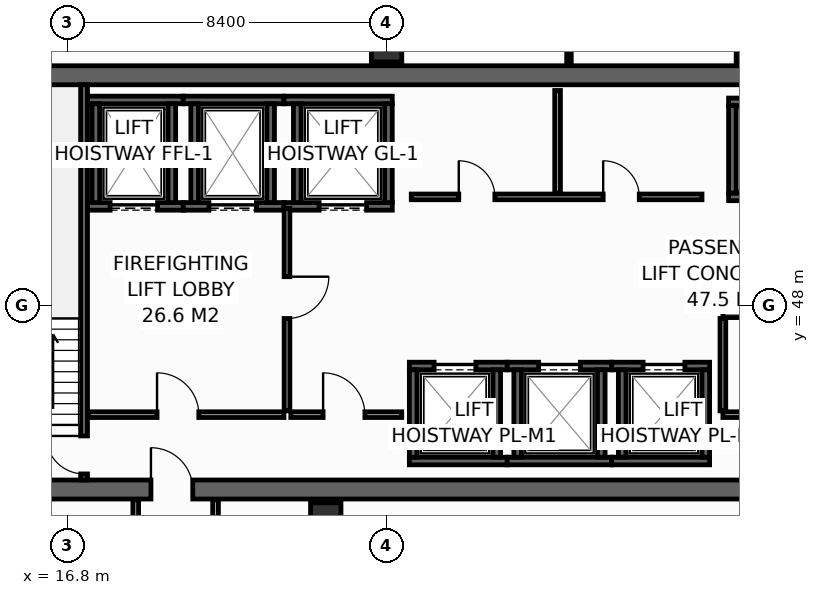
"""IFC4 building model, lengths in metres.
Left out: names, types, materials, properties, quantities, classifications, styles, units other than length and angle.
Written with IfcOpenShell. Run it as: python <this file> out.ifc"""

import sys

from ifc_helpers import new_model, si_unit, direction, frame, frame_2d, origin, origin_2d, place, context, subcontext, project, spatial, rectangle, hollow_rectangle, extrude, element, fill, save


model = new_model("IFC4")
c1 = context("Model", 3, precision=1e-05, world=origin(), true_north=direction((0.0, 1.0)))
c2 = subcontext(c1, "Body", "Model", "MODEL_VIEW")
j1 = project(units=[si_unit("LENGTHUNIT", "METRE"), si_unit("PLANEANGLEUNIT", "RADIAN")], contexts=[c1])
p1 = place(None, origin())
s1 = spatial("IfcSite", under=j1, at=p1, CompositionType="ELEMENT")
p2 = place(p1, origin())
s2 = spatial("IfcBuilding", under=s1, at=p2, CompositionType="ELEMENT")
p3 = place(p2, frame((0.0, 0.0, 213.2)))
s3 = spatial("IfcBuildingStorey", under=s2, at=p3, CompositionType="ELEMENT", Elevation=213.2)
p4 = place(p3, frame((13.6, 43.15, 0.0), z_axis=(0.0, 0.0, 1.0), x_axis=(1.0, 0.0, 0.0)))
e1 = element("IfcWall", 1, at=p4, inside=s3, PredefinedType="SHEAR", context=c2, shape_type="SweptSolid", body=[
    extrude(rectangle(XDim=32.7, YDim=0.5, at=frame_2d((16.35, 0.0))), origin(), (0.0, 0.0, 1.0), 3.55),
])
p5 = place(p4, frame((5.4, 0.0, 0.0)))
e2 = element("IfcOpeningElement", 2, at=p5, cuts=e1, PredefinedType="OPENING", context=c2, shape_type="SweptSolid", body=[
    extrude(rectangle(XDim=1.1, YDim=2.15, at=frame_2d((0.55, 1.075))), frame((0.0, 0.26, 0.0), z_axis=(0.0, -1.0, 0.0), x_axis=(1.0, 0.0, 0.0)), (0.0, 0.0, 1.0), 0.52),
])
p6 = place(p4, frame((25.6, 0.0, 0.0)))
e3 = element("IfcOpeningElement", 3, at=p6, cuts=e1, PredefinedType="OPENING", context=c2, shape_type="SweptSolid", body=[
    extrude(rectangle(XDim=1.1, YDim=2.15, at=frame_2d((0.55, 1.075))), frame((0.0, 0.26, 0.0), z_axis=(0.0, -1.0, 0.0), x_axis=(1.0, 0.0, 0.0)), (0.0, 0.0, 1.0), 0.52),
])
p7 = place(p3, frame((13.6, 54.05, 0.0), z_axis=(0.0, 0.0, 1.0), x_axis=(1.0, 0.0, 0.0)))
e4 = element("IfcWall", 4, at=p7, inside=s3, PredefinedType="SHEAR", context=c2, shape_type="SweptSolid", body=[
    extrude(rectangle(XDim=32.7, YDim=0.5, at=frame_2d((16.35, 0.0))), origin(), (0.0, 0.0, 1.0), 3.55),
])
for number, where, z_axis, x_axis in (
    (5, (25.2, 54.8, 0.0), (0.0, 0.0, 1.0), (1.0, 0.0, 0.0)),
    (6, (34.8, 54.8, 0.0), (0.0, 0.0, 1.0), (1.0, 0.0, 0.0)),
    (7, (23.6, 42.4, 0.0), (0.0, 0.0, 1.0), (1.0, 0.0, 0.0)),
):
    element("IfcColumn", number, at=place(p3, frame(where, z_axis=z_axis, x_axis=x_axis)), inside=s3, PredefinedType="COLUMN", context=c2, shape_type="SweptSolid", body=[
        extrude(hollow_rectangle(XDim=0.8, YDim=0.8, WallThickness=0.036, at=origin_2d()), origin(), (0.0, 0.0, 1.0), 3.8),
    ])
p8 = place(p3, frame((17.33, 50.6, 0.0), z_axis=(0.0, 0.0, 1.0), x_axis=(1.0, 0.0, 0.0)))
e8 = element("IfcWall", 8, at=p8, inside=s3, PredefinedType="SHEAR", context=c2, shape_type="SweptSolid", body=[
    extrude(rectangle(XDim=2.52, YDim=0.2, at=frame_2d((1.26, 0.0))), origin(), (0.0, 0.0, 1.0), 3.55),
])
p9 = place(p8, frame((0.595, 0.0, 0.0)))
e9 = element("IfcOpeningElement", 9, at=p9, cuts=e8, PredefinedType="OPENING", context=c2, shape_type="SweptSolid", body=[
    extrude(rectangle(XDim=1.25, YDim=2.3, at=frame_2d((0.625, 1.15))), frame((0.0, 0.11, 0.0), z_axis=(0.0, -1.0, 0.0), x_axis=(1.0, 0.0, 0.0)), (0.0, 0.0, 1.0), 0.22),
])
p10 = place(p3, frame((17.33, 53.4, 0.0), z_axis=(0.0, 0.0, 1.0), x_axis=(1.0, 0.0, 0.0)))
e10 = element("IfcWall", 10, at=p10, inside=s3, PredefinedType="SHEAR", context=c2, shape_type="SweptSolid", body=[
    extrude(rectangle(XDim=2.52, YDim=0.2, at=frame_2d((1.26, 0.0))), origin(), (0.0, 0.0, 1.0), 3.55),
])
for number, where, z_axis, x_axis in (
    (11, (17.55, 50.7, 0.0), (0.0, 0.0, 1.0), (0.0, 1.0, 0.0)),
    (12, (19.55, 50.7, 0.0), (0.0, 0.0, 1.0), (0.0, 1.0, 0.0)),
):
    element("IfcWall", number, at=place(p3, frame(where, z_axis=z_axis, x_axis=x_axis)), inside=s3, PredefinedType="SHEAR", context=c2, shape_type="SweptSolid", body=[
        extrude(rectangle(XDim=2.6, YDim=0.2, at=frame_2d((1.3, 0.0))), origin(), (0.0, 0.0, 1.0), 3.55),
    ])
p11 = place(p3, frame((19.85, 50.6, 0.0), z_axis=(0.0, 0.0, 1.0), x_axis=(1.0, 0.0, 0.0)))
e13 = element("IfcWall", 13, at=p11, inside=s3, PredefinedType="SHEAR", context=c2, shape_type="SweptSolid", body=[
    extrude(rectangle(XDim=2.65, YDim=0.2, at=frame_2d((1.325, 0.0))), origin(), (0.0, 0.0, 1.0), 3.55),
])
p12 = place(p11, frame((0.675, 0.0, 0.0)))
e14 = element("IfcOpeningElement", 14, at=p12, cuts=e13, PredefinedType="OPENING", context=c2, shape_type="SweptSolid", body=[
    extrude(rectangle(XDim=1.25, YDim=2.3, at=frame_2d((0.625, 1.15))), frame((0.0, 0.11, 0.0), z_axis=(0.0, -1.0, 0.0), x_axis=(1.0, 0.0, 0.0)), (0.0, 0.0, 1.0), 0.22),
])
p13 = place(p3, frame((19.85, 53.4, 0.0), z_axis=(0.0, 0.0, 1.0), x_axis=(1.0, 0.0, 0.0)))
e15 = element("IfcWall", 15, at=p13, inside=s3, PredefinedType="SHEAR", context=c2, shape_type="SweptSolid", body=[
    extrude(rectangle(XDim=2.65, YDim=0.2, at=frame_2d((1.325, 0.0))), origin(), (0.0, 0.0, 1.0), 3.55),
])
for number, where, z_axis, x_axis in (
    (16, (20.15, 50.7, 0.0), (0.0, 0.0, 1.0), (0.0, 1.0, 0.0)),
    (17, (22.15, 50.7, 0.0), (0.0, 0.0, 1.0), (0.0, 1.0, 0.0)),
):
    element("IfcWall", number, at=place(p3, frame(where, z_axis=z_axis, x_axis=x_axis)), inside=s3, PredefinedType="SHEAR", context=c2, shape_type="SweptSolid", body=[
        extrude(rectangle(XDim=2.6, YDim=0.2, at=frame_2d((1.3, 0.0))), origin(), (0.0, 0.0, 1.0), 3.55),
    ])
p14 = place(p3, frame((22.5, 50.6, 0.0), z_axis=(0.0, 0.0, 1.0), x_axis=(1.0, 0.0, 0.0)))
e18 = element("IfcWall", 18, at=p14, inside=s3, PredefinedType="SHEAR", context=c2, shape_type="SweptSolid", body=[
    extrude(rectangle(XDim=2.85, YDim=0.2, at=frame_2d((1.425, 0.0))), origin(), (0.0, 0.0, 1.0), 3.55),
])
p15 = place(p14, frame((0.925, 0.0, 0.0)))
e19 = element("IfcOpeningElement", 19, at=p15, cuts=e18, PredefinedType="OPENING", context=c2, shape_type="SweptSolid", body=[
    extrude(rectangle(XDim=1.25, YDim=2.3, at=frame_2d((0.625, 1.15))), frame((0.0, 0.11, 0.0), z_axis=(0.0, -1.0, 0.0), x_axis=(1.0, 0.0, 0.0)), (0.0, 0.0, 1.0), 0.22),
])
p16 = place(p3, frame((22.5, 53.4, 0.0), z_axis=(0.0, 0.0, 1.0), x_axis=(1.0, 0.0, 0.0)))
e20 = element("IfcWall", 20, at=p16, inside=s3, PredefinedType="SHEAR", context=c2, shape_type="SweptSolid", body=[
    extrude(rectangle(XDim=2.85, YDim=0.2, at=frame_2d((1.425, 0.0))), origin(), (0.0, 0.0, 1.0), 3.55),
])
for number, where, z_axis, x_axis in (
    (21, (22.85, 50.7, 0.0), (0.0, 0.0, 1.0), (0.0, 1.0, 0.0)),
    (22, (25.25, 50.7, 0.0), (0.0, 0.0, 1.0), (0.0, 1.0, 0.0)),
):
    element("IfcWall", number, at=place(p3, frame(where, z_axis=z_axis, x_axis=x_axis)), inside=s3, PredefinedType="SHEAR", context=c2, shape_type="SweptSolid", body=[
        extrude(rectangle(XDim=2.6, YDim=0.2, at=frame_2d((1.3, 0.0))), origin(), (0.0, 0.0, 1.0), 3.55),
    ])
p17 = place(p3, frame((25.8, 43.9, 0.0), z_axis=(0.0, 0.0, 1.0), x_axis=(1.0, 0.0, 0.0)))
e23 = element("IfcWall", 23, at=p17, inside=s3, PredefinedType="SHEAR", context=c2, shape_type="SweptSolid", body=[
    extrude(rectangle(XDim=2.575, YDim=0.2, at=frame_2d((1.288, 0.0))), origin(), (0.0, 0.0, 1.0), 3.55),
])
p18 = place(p3, frame((25.8, 46.4, 0.0), z_axis=(0.0, 0.0, 1.0), x_axis=(1.0, 0.0, 0.0)))
e24 = element("IfcWall", 24, at=p18, inside=s3, PredefinedType="SHEAR", context=c2, shape_type="SweptSolid", body=[
    extrude(rectangle(XDim=2.575, YDim=0.2, at=frame_2d((1.288, 0.0))), origin(), (0.0, 0.0, 1.0), 3.55),
])
p19 = place(p18, frame((0.65, 0.0, 0.0)))
e25 = element("IfcOpeningElement", 25, at=p19, cuts=e24, PredefinedType="OPENING", context=c2, shape_type="SweptSolid", body=[
    extrude(rectangle(XDim=1.1, YDim=2.2, at=frame_2d((0.55, 1.1))), frame((0.0, 0.11, 0.0), z_axis=(0.0, -1.0, 0.0), x_axis=(1.0, 0.0, 0.0)), (0.0, 0.0, 1.0), 0.22),
])
for number, where, z_axis, x_axis in (
    (26, (25.9, 44.0, 0.0), (0.0, 0.0, 1.0), (0.0, 1.0, 0.0)),
    (27, (28.1, 44.0, 0.0), (0.0, 0.0, 1.0), (0.0, 1.0, 0.0)),
):
    element("IfcWall", number, at=place(p3, frame(where, z_axis=z_axis, x_axis=x_axis)), inside=s3, PredefinedType="SHEAR", context=c2, shape_type="SweptSolid", body=[
        extrude(rectangle(XDim=2.3, YDim=0.2, at=frame_2d((1.15, 0.0))), origin(), (0.0, 0.0, 1.0), 3.55),
    ])
p20 = place(p3, frame((28.375, 43.9, 0.0), z_axis=(0.0, 0.0, 1.0), x_axis=(1.0, 0.0, 0.0)))
e28 = element("IfcWall", 28, at=p20, inside=s3, PredefinedType="SHEAR", context=c2, shape_type="SweptSolid", body=[
    extrude(rectangle(XDim=2.75, YDim=0.2, at=frame_2d((1.375, 0.0))), origin(), (0.0, 0.0, 1.0), 3.55),
])
p21 = place(p3, frame((28.375, 46.4, 0.0), z_axis=(0.0, 0.0, 1.0), x_axis=(1.0, 0.0, 0.0)))
e29 = element("IfcWall", 29, at=p21, inside=s3, PredefinedType="SHEAR", context=c2, shape_type="SweptSolid", body=[
    extrude(rectangle(XDim=2.75, YDim=0.2, at=frame_2d((1.375, 0.0))), origin(), (0.0, 0.0, 1.0), 3.55),
])
p22 = place(p21, frame((0.825, 0.0, 0.0)))
e30 = element("IfcOpeningElement", 30, at=p22, cuts=e29, PredefinedType="OPENING", context=c2, shape_type="SweptSolid", body=[
    extrude(rectangle(XDim=1.1, YDim=2.2, at=frame_2d((0.55, 1.1))), frame((0.0, 0.11, 0.0), z_axis=(0.0, -1.0, 0.0), x_axis=(1.0, 0.0, 0.0)), (0.0, 0.0, 1.0), 0.22),
])
for number, where, z_axis, x_axis in (
    (31, (28.65, 44.0, 0.0), (0.0, 0.0, 1.0), (0.0, 1.0, 0.0)),
    (32, (30.85, 44.0, 0.0), (0.0, 0.0, 1.0), (0.0, 1.0, 0.0)),
):
    element("IfcWall", number, at=place(p3, frame(where, z_axis=z_axis, x_axis=x_axis)), inside=s3, PredefinedType="SHEAR", context=c2, shape_type="SweptSolid", body=[
        extrude(rectangle(XDim=2.3, YDim=0.2, at=frame_2d((1.15, 0.0))), origin(), (0.0, 0.0, 1.0), 3.55),
    ])
p23 = place(p3, frame((31.125, 43.9, 0.0), z_axis=(0.0, 0.0, 1.0), x_axis=(1.0, 0.0, 0.0)))
e33 = element("IfcWall", 33, at=p23, inside=s3, PredefinedType="SHEAR", context=c2, shape_type="SweptSolid", body=[
    extrude(rectangle(XDim=2.575, YDim=0.2, at=frame_2d((1.288, 0.0))), origin(), (0.0, 0.0, 1.0), 3.55),
])
p24 = place(p3, frame((31.125, 46.4, 0.0), z_axis=(0.0, 0.0, 1.0), x_axis=(1.0, 0.0, 0.0)))
e34 = element("IfcWall", 34, at=p24, inside=s3, PredefinedType="SHEAR", context=c2, shape_type="SweptSolid", body=[
    extrude(rectangle(XDim=2.575, YDim=0.2, at=frame_2d((1.288, 0.0))), origin(), (0.0, 0.0, 1.0), 3.55),
])
p25 = place(p24, frame((0.825, 0.0, 0.0)))
e35 = element("IfcOpeningElement", 35, at=p25, cuts=e34, PredefinedType="OPENING", context=c2, shape_type="SweptSolid", body=[
    extrude(rectangle(XDim=1.1, YDim=2.2, at=frame_2d((0.55, 1.1))), frame((0.0, 0.11, 0.0), z_axis=(0.0, -1.0, 0.0), x_axis=(1.0, 0.0, 0.0)), (0.0, 0.0, 1.0), 0.22),
])
for number, where, z_axis, x_axis in (
    (36, (31.4, 44.0, 0.0), (0.0, 0.0, 1.0), (0.0, 1.0, 0.0)),
    (37, (33.6, 44.0, 0.0), (0.0, 0.0, 1.0), (0.0, 1.0, 0.0)),
):
    element("IfcWall", number, at=place(p3, frame(where, z_axis=z_axis, x_axis=x_axis)), inside=s3, PredefinedType="SHEAR", context=c2, shape_type="SweptSolid", body=[
        extrude(rectangle(XDim=2.3, YDim=0.2, at=frame_2d((1.15, 0.0))), origin(), (0.0, 0.0, 1.0), 3.55),
    ])
for number, where, z_axis, x_axis in (
    (38, (34.2, 50.85, 0.0), (0.0, 0.0, 1.0), (1.0, 0.0, 0.0)),
    (39, (34.2, 53.35, 0.0), (0.0, 0.0, 1.0), (1.0, 0.0, 0.0)),
):
    element("IfcWall", number, at=place(p3, frame(where, z_axis=z_axis, x_axis=x_axis)), inside=s3, PredefinedType="SHEAR", context=c2, shape_type="SweptSolid", body=[
        extrude(rectangle(XDim=2.575, YDim=0.2, at=frame_2d((1.288, 0.0))), origin(), (0.0, 0.0, 1.0), 3.55),
    ])
p26 = place(p3, frame((34.3, 50.95, 0.0), z_axis=(0.0, 0.0, 1.0), x_axis=(0.0, 1.0, 0.0)))
e40 = element("IfcWall", 40, at=p26, inside=s3, PredefinedType="SHEAR", context=c2, shape_type="SweptSolid", body=[
    extrude(rectangle(XDim=2.3, YDim=0.2, at=frame_2d((1.15, 0.0))), origin(), (0.0, 0.0, 1.0), 3.55),
])
p27 = place(p3, frame((17.24, 43.4, 0.0), z_axis=(0.0, 0.0, 1.0), x_axis=(0.0, 1.0, 0.0)))
e41 = element("IfcWall", 41, at=p27, inside=s3, PredefinedType="SHEAR", context=c2, shape_type="SweptSolid", body=[
    extrude(rectangle(XDim=10.4, YDim=0.18, at=frame_2d((5.2, 0.0))), origin(), (0.0, 0.0, 1.0), 3.55),
])
p28 = place(p27, frame((0.16, 0.0, 0.0)))
e42 = element("IfcOpeningElement", 42, at=p28, cuts=e41, PredefinedType="OPENING", context=c2, shape_type="SweptSolid", body=[
    extrude(rectangle(XDim=1.0, YDim=2.15, at=frame_2d((0.5, 1.075))), frame((0.0, 0.1, 0.0), z_axis=(0.0, -1.0, 0.0), x_axis=(1.0, 0.0, 0.0)), (0.0, 0.0, 1.0), 0.2),
])
p29 = place(p3, frame((17.36, 45.12, 0.0), z_axis=(0.0, 0.0, 1.0), x_axis=(1.0, 0.0, 0.0)))
e43 = element("IfcWall", 43, at=p29, inside=s3, PredefinedType="PARTITIONING", context=c2, shape_type="SweptSolid", body=[
    extrude(rectangle(XDim=5.14, YDim=0.15, at=frame_2d((2.57, 0.0))), origin(), (0.0, 0.0, 1.0), 3.55),
])
p30 = place(p29, frame((1.8, 0.0, 0.0)))
e44 = element("IfcOpeningElement", 44, at=p30, cuts=e43, PredefinedType="OPENING", context=c2, shape_type="SweptSolid", body=[
    extrude(rectangle(XDim=1.1, YDim=2.15, at=frame_2d((0.55, 1.075))), frame((0.0, 0.085, 0.0), z_axis=(0.0, -1.0, 0.0), x_axis=(1.0, 0.0, 0.0)), (0.0, 0.0, 1.0), 0.17),
])
p31 = place(p3, frame((22.58, 50.55, 0.0), z_axis=(0.0, 0.0, 1.0), x_axis=(0.0, -1.0, 0.0)))
e45 = element("IfcWall", 45, at=p31, inside=s3, PredefinedType="PARTITIONING", context=c2, shape_type="SweptSolid", body=[
    extrude(rectangle(XDim=5.33, YDim=0.15, at=frame_2d((2.665, 0.0))), origin(), (0.0, 0.0, 1.0), 3.55),
])
p32 = place(p31, frame((1.8, 0.0, 0.0)))
e46 = element("IfcOpeningElement", 46, at=p32, cuts=e45, PredefinedType="OPENING", context=c2, shape_type="SweptSolid", body=[
    extrude(rectangle(XDim=1.1, YDim=2.15, at=frame_2d((0.55, 1.075))), frame((0.0, 0.085, 0.0), z_axis=(0.0, -1.0, 0.0), x_axis=(1.0, 0.0, 0.0)), (0.0, 0.0, 1.0), 0.17),
])
p33 = place(p3, frame((22.68, 45.12, 0.0), z_axis=(0.0, 0.0, 1.0), x_axis=(1.0, 0.0, 0.0)))
e47 = element("IfcWall", 47, at=p33, inside=s3, PredefinedType="PARTITIONING", context=c2, shape_type="SweptSolid", body=[
    extrude(rectangle(XDim=2.92, YDim=0.15, at=frame_2d((1.46, 0.0))), origin(), (0.0, 0.0, 1.0), 3.55),
])
p34 = place(p33, frame((0.85, 0.0, 0.0)))
e48 = element("IfcOpeningElement", 48, at=p34, cuts=e47, PredefinedType="OPENING", context=c2, shape_type="SweptSolid", body=[
    extrude(rectangle(XDim=1.1, YDim=2.15, at=frame_2d((0.55, 1.075))), frame((0.0, 0.085, 0.0), z_axis=(0.0, -1.0, 0.0), x_axis=(1.0, 0.0, 0.0)), (0.0, 0.0, 1.0), 0.17),
])
p35 = place(p3, frame((34.05, 45.12, 0.0), z_axis=(0.0, 0.0, 1.0), x_axis=(1.0, 0.0, 0.0)))
e49 = element("IfcWall", 49, at=p35, inside=s3, PredefinedType="PARTITIONING", context=c2, shape_type="SweptSolid", body=[
    extrude(rectangle(XDim=8.45, YDim=0.15, at=frame_2d((4.225, 0.0))), origin(), (0.0, 0.0, 1.0), 3.55),
])
p36 = place(p35, frame((3.6, 0.0, 0.0)))
e50 = element("IfcOpeningElement", 50, at=p36, cuts=e49, PredefinedType="OPENING", context=c2, shape_type="SweptSolid", body=[
    extrude(rectangle(XDim=0.95, YDim=2.15, at=frame_2d((0.475, 1.075))), frame((0.0, 0.085, 0.0), z_axis=(0.0, -1.0, 0.0), x_axis=(1.0, 0.0, 0.0)), (0.0, 0.0, 1.0), 0.17),
])
p37 = place(p3, frame((34.05, 47.75, 0.0), z_axis=(0.0, 0.0, 1.0), x_axis=(1.0, 0.0, 0.0)))
e51 = element("IfcWall", 51, at=p37, inside=s3, PredefinedType="PARTITIONING", context=c2, shape_type="SweptSolid", body=[
    extrude(rectangle(XDim=8.45, YDim=0.15, at=frame_2d((4.225, 0.0))), origin(), (0.0, 0.0, 1.0), 3.55),
])
p38 = place(p3, frame((34.05, 45.22, 0.0), z_axis=(0.0, 0.0, 1.0), x_axis=(0.0, 1.0, 0.0)))
e52 = element("IfcWall", 52, at=p38, inside=s3, PredefinedType="PARTITIONING", context=c2, shape_type="SweptSolid", body=[
    extrude(rectangle(XDim=2.43, YDim=0.15, at=frame_2d((1.215, 0.0))), origin(), (0.0, 0.0, 1.0), 3.55),
])
p39 = place(p3, frame((25.85, 50.85, 0.0), z_axis=(0.0, 0.0, 1.0), x_axis=(1.0, 0.0, 0.0)))
e53 = element("IfcWall", 53, at=p39, inside=s3, PredefinedType="PARTITIONING", context=c2, shape_type="SweptSolid", body=[
    extrude(rectangle(XDim=7.65, YDim=0.15, at=frame_2d((3.825, 0.0))), origin(), (0.0, 0.0, 1.0), 3.55),
])
p40 = place(p39, frame((1.25, 0.0, 0.0)))
e54 = element("IfcOpeningElement", 54, at=p40, cuts=e53, PredefinedType="OPENING", context=c2, shape_type="SweptSolid", body=[
    extrude(rectangle(XDim=0.95, YDim=2.15, at=frame_2d((0.475, 1.075))), frame((0.0, 0.085, 0.0), z_axis=(0.0, -1.0, 0.0), x_axis=(1.0, 0.0, 0.0)), (0.0, 0.0, 1.0), 0.17),
])
p41 = place(p39, frame((5.05, 0.0, 0.0)))
e55 = element("IfcOpeningElement", 55, at=p41, cuts=e53, PredefinedType="OPENING", context=c2, shape_type="SweptSolid", body=[
    extrude(rectangle(XDim=0.95, YDim=2.15, at=frame_2d((0.475, 1.075))), frame((0.0, 0.085, 0.0), z_axis=(0.0, -1.0, 0.0), x_axis=(1.0, 0.0, 0.0)), (0.0, 0.0, 1.0), 0.17),
])
p42 = place(p3, frame((29.7, 50.95, 0.0), z_axis=(0.0, 0.0, 1.0), x_axis=(0.0, 1.0, 0.0)))
e56 = element("IfcWall", 56, at=p42, inside=s3, PredefinedType="PARTITIONING", context=c2, shape_type="SweptSolid", body=[
    extrude(rectangle(XDim=2.7, YDim=0.15, at=frame_2d((1.35, 0.0))), origin(), (0.0, 0.0, 1.0), 3.55),
])
p43 = place(p3, frame((30.0, 54.32, 0.0), z_axis=(0.0, 0.0, 1.0), x_axis=(0.0, 1.0, 0.0)))
e57 = element("IfcWall", 57, at=p43, inside=s3, PredefinedType="PARTITIONING", context=c2, shape_type="SweptSolid", body=[
    extrude(rectangle(XDim=1.675, YDim=0.12, at=frame_2d((0.837, 0.0))), origin(), (0.0, 0.0, 1.0), 2.935),
])
for number, where, z_axis, x_axis in (
    (58, (18.6, 40.75, 0.0), (0.0, 0.0, 1.0), (0.0, 1.0, 0.0)),
    (59, (20.7, 40.75, 0.0), (0.0, 0.0, 1.0), (0.0, 1.0, 0.0)),
):
    element("IfcWall", number, at=place(p3, frame(where, z_axis=z_axis, x_axis=x_axis)), inside=s3, PredefinedType="PARTITIONING", context=c2, shape_type="SweptSolid", body=[
        extrude(rectangle(XDim=2.13, YDim=0.15, at=frame_2d((1.065, 0.0))), origin(), (0.0, 0.0, 1.0), 3.55),
    ])
p44 = place(p9, origin())
e60 = element("IfcDoor", 60, at=p44, inside=s3, OperationType="SLIDING_TO_LEFT", PredefinedType="DOOR", context=c2, shape_type="SweptSolid", body=[
    extrude(rectangle(XDim=1.25, YDim=2.3, at=frame_2d((0.625, 1.15))), frame((0.0, 0.025, 0.0), z_axis=(0.0, -1.0, 0.0), x_axis=(1.0, 0.0, 0.0)), (0.0, 0.0, 1.0), 0.05),
])
fill(e9, e60)
p45 = place(p12, origin())
e61 = element("IfcDoor", 61, at=p45, inside=s3, OperationType="SLIDING_TO_LEFT", PredefinedType="DOOR", context=c2, shape_type="SweptSolid", body=[
    extrude(rectangle(XDim=1.25, YDim=2.3, at=frame_2d((0.625, 1.15))), frame((0.0, 0.025, 0.0), z_axis=(0.0, -1.0, 0.0), x_axis=(1.0, 0.0, 0.0)), (0.0, 0.0, 1.0), 0.05),
])
fill(e14, e61)
p46 = place(p15, origin())
e62 = element("IfcDoor", 62, at=p46, inside=s3, OperationType="SLIDING_TO_LEFT", PredefinedType="DOOR", context=c2, shape_type="SweptSolid", body=[
    extrude(rectangle(XDim=1.25, YDim=2.3, at=frame_2d((0.625, 1.15))), frame((0.0, 0.025, 0.0), z_axis=(0.0, -1.0, 0.0), x_axis=(1.0, 0.0, 0.0)), (0.0, 0.0, 1.0), 0.05),
])
fill(e19, e62)
p47 = place(p19, origin())
e63 = element("IfcDoor", 63, at=p47, inside=s3, OperationType="SLIDING_TO_LEFT", PredefinedType="DOOR", context=c2, shape_type="SweptSolid", body=[
    extrude(rectangle(XDim=1.1, YDim=2.2, at=frame_2d((0.55, 1.1))), frame((0.0, 0.025, 0.0), z_axis=(0.0, -1.0, 0.0), x_axis=(1.0, 0.0, 0.0)), (0.0, 0.0, 1.0), 0.05),
])
fill(e25, e63)
p48 = place(p22, origin())
e64 = element("IfcDoor", 64, at=p48, inside=s3, OperationType="SLIDING_TO_LEFT", PredefinedType="DOOR", context=c2, shape_type="SweptSolid", body=[
    extrude(rectangle(XDim=1.1, YDim=2.2, at=frame_2d((0.55, 1.1))), frame((0.0, 0.025, 0.0), z_axis=(0.0, -1.0, 0.0), x_axis=(1.0, 0.0, 0.0)), (0.0, 0.0, 1.0), 0.05),
])
fill(e30, e64)
p49 = place(p25, origin())
e65 = element("IfcDoor", 65, at=p49, inside=s3, OperationType="SLIDING_TO_LEFT", PredefinedType="DOOR", context=c2, shape_type="SweptSolid", body=[
    extrude(rectangle(XDim=1.1, YDim=2.2, at=frame_2d((0.55, 1.1))), frame((0.0, 0.025, 0.0), z_axis=(0.0, -1.0, 0.0), x_axis=(1.0, 0.0, 0.0)), (0.0, 0.0, 1.0), 0.05),
])
fill(e35, e65)
p50 = place(p28, origin())
e66 = element("IfcDoor", 66, at=p50, inside=s3, OperationType="SINGLE_SWING_RIGHT", PredefinedType="DOOR", context=c2, shape_type="SweptSolid", body=[
    extrude(rectangle(XDim=1.0, YDim=2.15, at=frame_2d((0.5, 1.075))), frame((0.0, 0.025, 0.0), z_axis=(0.0, -1.0, 0.0), x_axis=(1.0, 0.0, 0.0)), (0.0, 0.0, 1.0), 0.05),
])
fill(e42, e66)
p51 = place(p30, origin())
e67 = element("IfcDoor", 67, at=p51, inside=s3, OperationType="SINGLE_SWING_LEFT", PredefinedType="DOOR", context=c2, shape_type="SweptSolid", body=[
    extrude(rectangle(XDim=1.1, YDim=2.15, at=frame_2d((0.55, 1.075))), frame((0.0, 0.025, 0.0), z_axis=(0.0, -1.0, 0.0), x_axis=(1.0, 0.0, 0.0)), (0.0, 0.0, 1.0), 0.05),
])
fill(e44, e67)
p52 = place(p32, origin())
e68 = element("IfcDoor", 68, at=p52, inside=s3, OperationType="SINGLE_SWING_LEFT", PredefinedType="DOOR", context=c2, shape_type="SweptSolid", body=[
    extrude(rectangle(XDim=1.1, YDim=2.15, at=frame_2d((0.55, 1.075))), frame((0.0, 0.025, 0.0), z_axis=(0.0, -1.0, 0.0), x_axis=(1.0, 0.0, 0.0)), (0.0, 0.0, 1.0), 0.05),
])
fill(e46, e68)
p53 = place(p34, origin())
e69 = element("IfcDoor", 69, at=p53, inside=s3, OperationType="SINGLE_SWING_LEFT", PredefinedType="DOOR", context=c2, shape_type="SweptSolid", body=[
    extrude(rectangle(XDim=1.1, YDim=2.15, at=frame_2d((0.55, 1.075))), frame((0.0, 0.025, 0.0), z_axis=(0.0, -1.0, 0.0), x_axis=(1.0, 0.0, 0.0)), (0.0, 0.0, 1.0), 0.05),
])
fill(e48, e69)
p54 = place(p5, origin())
e70 = element("IfcDoor", 70, at=p54, inside=s3, OperationType="SINGLE_SWING_LEFT", PredefinedType="DOOR", context=c2, shape_type="SweptSolid", body=[
    extrude(rectangle(XDim=1.1, YDim=2.15, at=frame_2d((0.55, 1.075))), frame((0.0, 0.025, 0.0), z_axis=(0.0, -1.0, 0.0), x_axis=(1.0, 0.0, 0.0)), (0.0, 0.0, 1.0), 0.05),
])
fill(e2, e70)
p55 = place(p40, origin())
e71 = element("IfcDoor", 71, at=p55, inside=s3, OperationType="SINGLE_SWING_LEFT", PredefinedType="DOOR", context=c2, shape_type="SweptSolid", body=[
    extrude(rectangle(XDim=0.95, YDim=2.15, at=frame_2d((0.475, 1.075))), frame((0.0, 0.025, 0.0), z_axis=(0.0, -1.0, 0.0), x_axis=(1.0, 0.0, 0.0)), (0.0, 0.0, 1.0), 0.05),
])
fill(e54, e71)
p56 = place(p41, origin())
e72 = element("IfcDoor", 72, at=p56, inside=s3, OperationType="SINGLE_SWING_LEFT", PredefinedType="DOOR", context=c2, shape_type="SweptSolid", body=[
    extrude(rectangle(XDim=0.95, YDim=2.15, at=frame_2d((0.475, 1.075))), frame((0.0, 0.025, 0.0), z_axis=(0.0, -1.0, 0.0), x_axis=(1.0, 0.0, 0.0)), (0.0, 0.0, 1.0), 0.05),
])
fill(e55, e72)
save(model, sys.argv[1])
